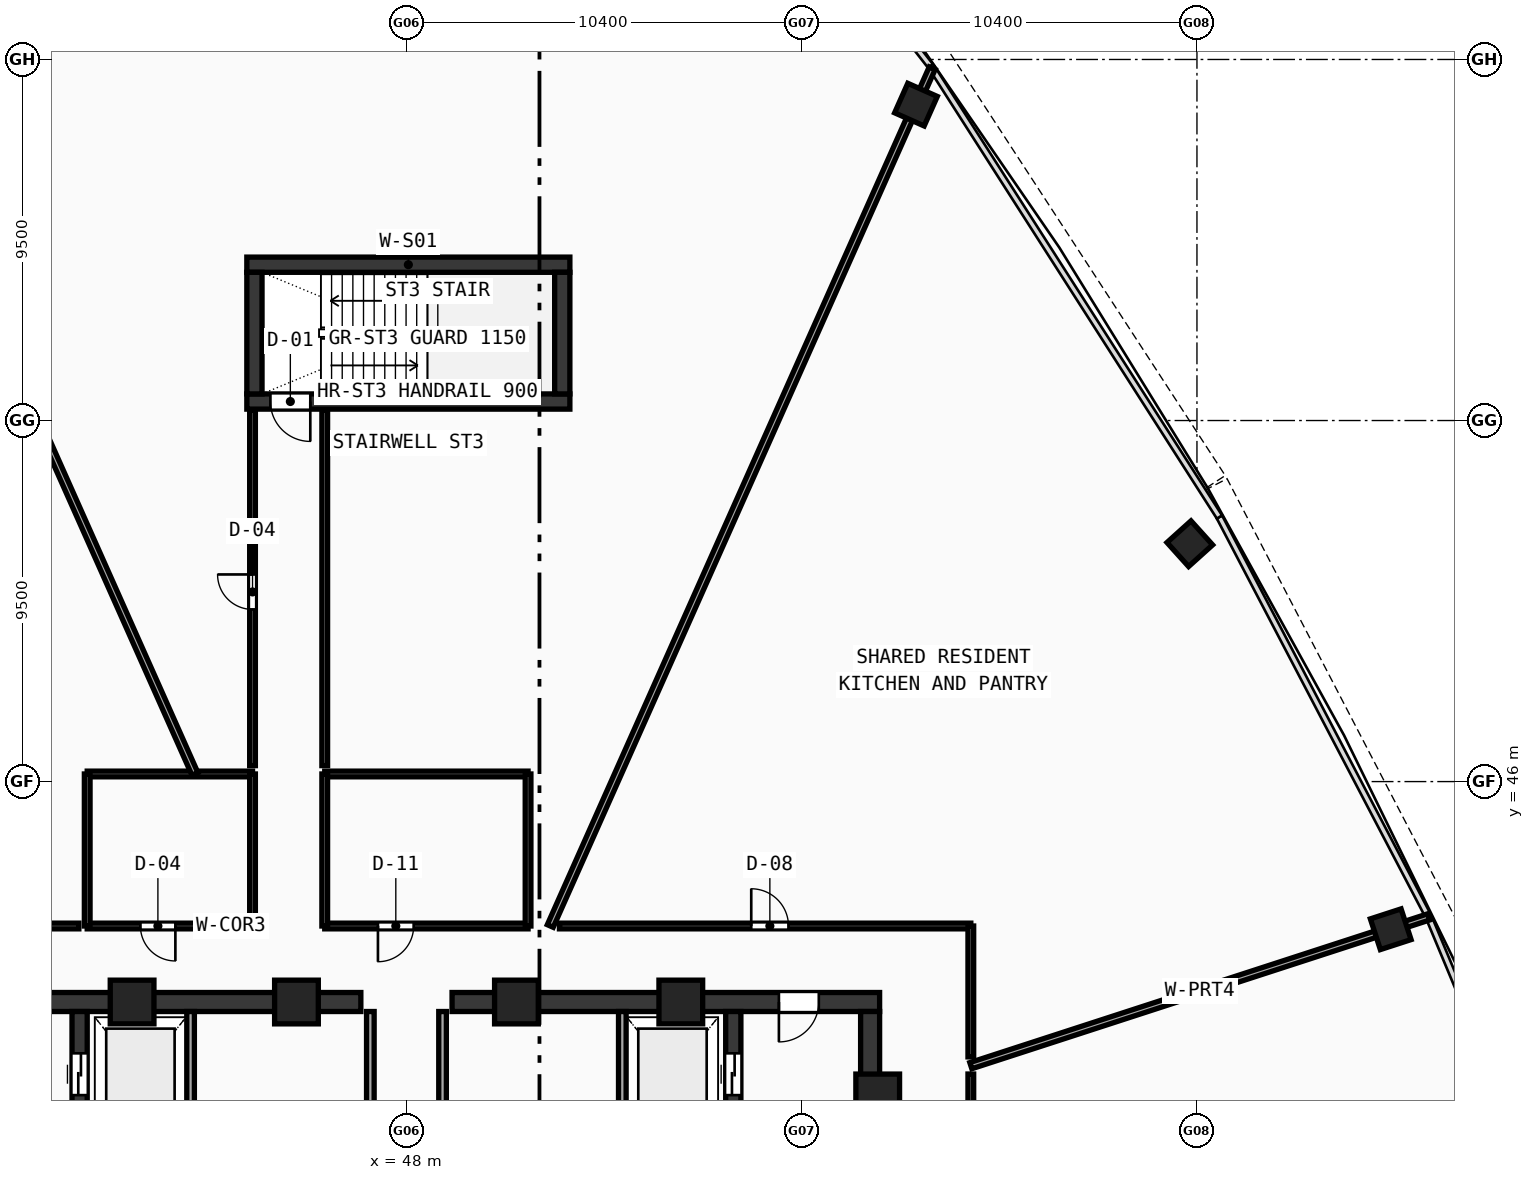
"""IFC4 building model, lengths in metres.
Left out: names, types, materials, properties, quantities, classifications, styles, units other than length and angle.
Written with IfcOpenShell. Run it as: python <this file> out.ifc"""

import sys

from ifc_helpers import new_model, si_unit, direction, frame, frame_2d, origin, origin_with_axes, origin_2d, place, context, subcontext, project, spatial, rectangle, hollow_rectangle, extrude, source, transform, mapped, element, fill, save


model = new_model("IFC4")
c1 = context("Model", 3, precision=1e-05, world=origin(), true_north=direction((0.0, 1.0)))
c2 = subcontext(c1, "Body", "Model", "MODEL_VIEW")
j1 = project(units=[si_unit("LENGTHUNIT", "METRE"), si_unit("PLANEANGLEUNIT", "RADIAN")], contexts=[c1])
p1 = place(None, origin())
s1 = spatial("IfcSite", under=j1, at=p1, CompositionType="ELEMENT")
p2 = place(p1, origin())
s2 = spatial("IfcBuilding", under=s1, at=p2, CompositionType="ELEMENT")
p3 = place(p2, frame((0.0, 0.0, 263.18)))
s3 = spatial("IfcBuildingStorey", under=s2, at=p3, CompositionType="ELEMENT", Elevation=263.18)
p4 = place(p3, frame((35.55, 40.2, 0.0), z_axis=(0.0, 0.0, 1.0), x_axis=(1.0, 0.0, 0.0)))
e1 = element("IfcWall", 1, at=p4, inside=s3, PredefinedType="SHEAR", context=c2, shape_type="SweptSolid", body=[
    extrude(rectangle(XDim=11.25, YDim=0.5, at=frame_2d((5.625, 0.0))), origin(), (0.0, 0.0, 1.0), 3.47),
])
p5 = place(p4, frame((1.6, 0.0, 0.0)))
e2 = element("IfcOpeningElement", 2, at=p5, cuts=e1, PredefinedType="OPENING", context=c2, shape_type="SweptSolid", body=[
    extrude(rectangle(XDim=1.05, YDim=2.1, at=frame_2d((0.525, 1.05))), frame((0.0, 0.26, 0.0), z_axis=(0.0, -1.0, 0.0), x_axis=(1.0, 0.0, 0.0)), (0.0, 0.0, 1.0), 0.52),
])
p6 = place(p3, frame((49.2, 40.2, 0.0), z_axis=(0.0, 0.0, 1.0), x_axis=(1.0, 0.0, 0.0)))
e3 = element("IfcWall", 3, at=p6, inside=s3, PredefinedType="SHEAR", context=c2, shape_type="SweptSolid", body=[
    extrude(rectangle(XDim=11.25, YDim=0.5, at=frame_2d((5.625, 0.0))), origin(), (0.0, 0.0, 1.0), 3.47),
])
p7 = place(p6, frame((8.6, 0.0, 0.0)))
e4 = element("IfcOpeningElement", 4, at=p7, cuts=e3, PredefinedType="OPENING", context=c2, shape_type="SweptSolid", body=[
    extrude(rectangle(XDim=1.05, YDim=2.1, at=frame_2d((0.525, 1.05))), frame((0.0, 0.26, 0.0), z_axis=(0.0, -1.0, 0.0), x_axis=(1.0, 0.0, 0.0)), (0.0, 0.0, 1.0), 0.52),
])
p8 = place(p3, frame((60.2, 27.75, 0.0), z_axis=(0.0, 0.0, 1.0), x_axis=(0.0, 1.0, 0.0)))
e5 = element("IfcWall", 5, at=p8, inside=s3, PredefinedType="SHEAR", context=c2, shape_type="SweptSolid", body=[
    extrude(rectangle(XDim=12.2, YDim=0.5, at=frame_2d((6.1, 0.0))), origin(), (0.0, 0.0, 1.0), 3.47),
])
p9 = place(p3, frame((39.4, 27.75, 0.0), z_axis=(0.0, 0.0, 1.0), x_axis=(0.0, 1.0, 0.0)))
e6 = element("IfcWall", 6, at=p9, inside=s3, PredefinedType="SHEAR", context=c2, shape_type="SweptSolid", body=[
    extrude(rectangle(XDim=12.2, YDim=0.4, at=frame_2d((6.1, 0.0))), origin(), (0.0, 0.0, 1.0), 3.47),
])
p10 = place(p9, frame((10.0, 0.0, 0.0)))
e7 = element("IfcOpeningElement", 7, at=p10, cuts=e6, PredefinedType="OPENING", context=c2, shape_type="SweptSolid", body=[
    extrude(rectangle(XDim=1.1, YDim=2.1, at=frame_2d((0.55, 1.05))), frame((0.0, 0.21, 0.0), z_axis=(0.0, -1.0, 0.0), x_axis=(1.0, 0.0, 0.0)), (0.0, 0.0, 1.0), 0.42),
])
p11 = place(p3, frame((56.6, 27.75, 0.0), z_axis=(0.0, 0.0, 1.0), x_axis=(0.0, 1.0, 0.0)))
e8 = element("IfcWall", 8, at=p11, inside=s3, PredefinedType="SHEAR", context=c2, shape_type="SweptSolid", body=[
    extrude(rectangle(XDim=12.2, YDim=0.4, at=frame_2d((6.1, 0.0))), origin(), (0.0, 0.0, 1.0), 3.47),
])
p12 = place(p11, frame((10.0, 0.0, 0.0)))
e9 = element("IfcOpeningElement", 9, at=p12, cuts=e8, PredefinedType="OPENING", context=c2, shape_type="SweptSolid", body=[
    extrude(rectangle(XDim=1.1, YDim=2.1, at=frame_2d((0.55, 1.05))), frame((0.0, 0.21, 0.0), z_axis=(0.0, -1.0, 0.0), x_axis=(1.0, 0.0, 0.0)), (0.0, 0.0, 1.0), 0.42),
])
p13 = place(p3, frame((43.8, 59.6, 0.0), z_axis=(0.0, 0.0, 1.0), x_axis=(1.0, 0.0, 0.0)))
e10 = element("IfcWall", 10, at=p13, inside=s3, PredefinedType="SHEAR", context=c2, shape_type="SweptSolid", body=[
    extrude(rectangle(XDim=8.5, YDim=0.4, at=frame_2d((4.25, 0.0))), origin(), (0.0, 0.0, 1.0), 3.47),
])
p14 = place(p3, frame((43.8, 56.0, 0.0), z_axis=(0.0, 0.0, 1.0), x_axis=(1.0, 0.0, 0.0)))
e11 = element("IfcWall", 11, at=p14, inside=s3, PredefinedType="SHEAR", context=c2, shape_type="SweptSolid", body=[
    extrude(rectangle(XDim=8.5, YDim=0.4, at=frame_2d((4.25, 0.0))), origin(), (0.0, 0.0, 1.0), 3.47),
])
p15 = place(p14, frame((0.62, 0.0, 0.0)))
e12 = element("IfcOpeningElement", 12, at=p15, cuts=e11, PredefinedType="OPENING", context=c2, shape_type="SweptSolid", body=[
    extrude(rectangle(XDim=1.05, YDim=2.1, at=frame_2d((0.525, 1.05))), frame((0.0, 0.21, 0.0), z_axis=(0.0, -1.0, 0.0), x_axis=(1.0, 0.0, 0.0)), (0.0, 0.0, 1.0), 0.42),
])
for number, where, z_axis, x_axis in (
    (13, (44.0, 56.2, 0.0), (0.0, 0.0, 1.0), (0.0, 1.0, 0.0)),
    (14, (52.1, 56.2, 0.0), (0.0, 0.0, 1.0), (0.0, 1.0, 0.0)),
):
    element("IfcWall", number, at=place(p3, frame(where, z_axis=z_axis, x_axis=x_axis)), inside=s3, PredefinedType="SHEAR", context=c2, shape_type="SweptSolid", body=[
        extrude(rectangle(XDim=3.2, YDim=0.4, at=frame_2d((1.6, 0.0))), origin(), (0.0, 0.0, 1.0), 3.47),
    ])
m1 = source(origin(), c2, "Body", "SweptSolid", [
    extrude(hollow_rectangle(XDim=1.15, YDim=1.15, WallThickness=0.048, at=origin_2d()), origin(), (0.0, 0.0, 1.0), 3.73),
])
for number, where, z_axis, x_axis in (
    (15, (60.4, 37.729, -0.26), (0.0, 0.0, 1.0), (1.0, 0.0, 0.0)),
    (16, (55.219, 40.2, -0.26), (0.0, 0.0, 1.0), (1.0, 0.0, 0.0)),
    (17, (50.894, 40.2, -0.26), (0.0, 0.0, 1.0), (1.0, 0.0, 0.0)),
    (18, (45.106, 40.2, -0.26), (0.0, 0.0, 1.0), (1.0, 0.0, 0.0)),
    (19, (40.781, 40.2, -0.26), (0.0, 0.0, 1.0), (1.0, 0.0, 0.0)),
):
    element("IfcColumn", number, at=place(p3, frame(where, z_axis=z_axis, x_axis=x_axis)), inside=s3, PredefinedType="COLUMN", context=c2, shape_type="MappedRepresentation", body=[
        mapped(m1, transform((0.0, 0.0, 0.0), scale=1.0)),
    ])
m2 = source(origin(), c2, "Body", "SweptSolid", [
    extrude(hollow_rectangle(XDim=0.85, YDim=0.85, WallThickness=0.034, at=origin_2d()), origin(), (0.0, 0.0, 1.0), 3.73),
])
for number, where, z_axis, x_axis in (
    (20, (73.899, 42.115, -0.26), (0.0, 0.0, 1.0), (-0.309, 0.951, 0.0)),
    (21, (68.612, 52.259, -0.26), (0.0, 0.0, 1.0), (-0.669, 0.743, 0.0)),
    (22, (61.407, 63.812, -0.26), (0.0, 0.0, 1.0), (-0.914, 0.407, 0.0)),
):
    element("IfcColumn", number, at=place(p3, frame(where, z_axis=z_axis, x_axis=x_axis)), inside=s3, PredefinedType="COLUMN", context=c2, shape_type="MappedRepresentation", body=[
        mapped(m2, transform((0.0, 0.0, 0.0), scale=1.0)),
    ])
p16 = place(p3, frame((42.32, 33.5, 0.0), z_axis=(0.0, 0.0, 1.0), x_axis=(0.0, 1.0, 0.0)))
e23 = element("IfcWall", 23, at=p16, inside=s3, PredefinedType="SOLIDWALL", context=c2, shape_type="SweptSolid", body=[
    extrude(rectangle(XDim=6.45, YDim=0.2, at=frame_2d((3.225, 0.0))), origin(), (0.0, 0.0, 1.0), 3.47),
])
p17 = place(p16, frame((1.0, 0.0, 0.0)))
e24 = element("IfcOpeningElement", 24, at=p17, cuts=e23, PredefinedType="OPENING", context=c2, shape_type="SweptSolid", body=[
    extrude(rectangle(XDim=1.05, YDim=2.1, at=frame_2d((0.525, 1.05))), frame((0.0, 0.11, 0.0), z_axis=(0.0, -1.0, 0.0), x_axis=(1.0, 0.0, 0.0)), (0.0, 0.0, 1.0), 0.22),
])
p18 = place(p3, frame((53.68, 36.65, 0.0), z_axis=(0.0, 0.0, 1.0), x_axis=(0.0, 1.0, 0.0)))
e25 = element("IfcWall", 25, at=p18, inside=s3, PredefinedType="SOLIDWALL", context=c2, shape_type="SweptSolid", body=[
    extrude(rectangle(XDim=3.3, YDim=0.2, at=frame_2d((1.65, 0.0))), origin(), (0.0, 0.0, 1.0), 3.47),
])
p19 = place(p3, frame((47.05, 37.32, 0.0), z_axis=(0.0, 0.0, 1.0), x_axis=(0.0, 1.0, 0.0)))
e26 = element("IfcWall", 26, at=p19, inside=s3, PredefinedType="SOLIDWALL", context=c2, shape_type="SweptSolid", body=[
    extrude(rectangle(XDim=2.63, YDim=0.2, at=frame_2d((1.315, 0.0))), origin(), (0.0, 0.0, 1.0), 3.47),
])
p20 = place(p3, frame((48.95, 35.85, 0.0), z_axis=(0.0, 0.0, 1.0), x_axis=(0.0, 1.0, 0.0)))
e27 = element("IfcWall", 27, at=p20, inside=s3, PredefinedType="SOLIDWALL", context=c2, shape_type="SweptSolid", body=[
    extrude(rectangle(XDim=4.1, YDim=0.2, at=frame_2d((2.05, 0.0))), origin(), (0.0, 0.0, 1.0), 3.47),
])
p21 = place(p3, frame((39.6, 42.2, 0.0), z_axis=(0.0, 0.0, 1.0), x_axis=(1.0, 0.0, 0.0)))
e28 = element("IfcWall", 28, at=p21, inside=s3, PredefinedType="PARTITIONING", context=c2, shape_type="SweptSolid", body=[
    extrude(rectangle(XDim=4.35, YDim=0.15, at=frame_2d((2.175, 0.0))), origin(), (0.0, 0.0, 1.0), 3.47),
])
p22 = place(p21, frame((1.4, 0.0, 0.0)))
e29 = element("IfcOpeningElement", 29, at=p22, cuts=e28, PredefinedType="OPENING", context=c2, shape_type="SweptSolid", body=[
    extrude(rectangle(XDim=0.92, YDim=2.1, at=frame_2d((0.46, 1.05))), frame((0.0, 0.085, 0.0), z_axis=(0.0, -1.0, 0.0), x_axis=(1.0, 0.0, 0.0)), (0.0, 0.0, 1.0), 0.17),
])
p23 = place(p3, frame((39.6, 46.2, 0.0), z_axis=(0.0, 0.0, 1.0), x_axis=(1.0, 0.0, 0.0)))
e30 = element("IfcWall", 30, at=p23, inside=s3, PredefinedType="PARTITIONING", context=c2, shape_type="SweptSolid", body=[
    extrude(rectangle(XDim=4.35, YDim=0.15, at=frame_2d((2.175, 0.0))), origin(), (0.0, 0.0, 1.0), 2.82),
])
p24 = place(p3, frame((39.6, 42.2, 0.0), z_axis=(0.0, 0.0, 1.0), x_axis=(0.0, 1.0, 0.0)))
e31 = element("IfcWall", 31, at=p24, inside=s3, PredefinedType="PARTITIONING", context=c2, shape_type="SweptSolid", body=[
    extrude(rectangle(XDim=4.0, YDim=0.15, at=frame_2d((2.0, 0.0))), origin(), (0.0, 0.0, 1.0), 3.47),
])
p25 = place(p3, frame((43.95, 42.2, 0.0), z_axis=(0.0, 0.0, 1.0), x_axis=(0.0, 1.0, 0.0)))
e32 = element("IfcWall", 32, at=p25, inside=s3, PredefinedType="PARTITIONING", context=c2, shape_type="SweptSolid", body=[
    extrude(rectangle(XDim=4.0, YDim=0.15, at=frame_2d((2.0, 0.0))), origin(), (0.0, 0.0, 1.0), 2.82),
])
p26 = place(p3, frame((45.85, 42.2, 0.0), z_axis=(0.0, 0.0, 1.0), x_axis=(1.0, 0.0, 0.0)))
e33 = element("IfcWall", 33, at=p26, inside=s3, PredefinedType="PARTITIONING", context=c2, shape_type="SweptSolid", body=[
    extrude(rectangle(XDim=5.35, YDim=0.15, at=frame_2d((2.675, 0.0))), origin(), (0.0, 0.0, 1.0), 3.47),
])
p27 = place(p26, frame((1.4, 0.0, 0.0)))
e34 = element("IfcOpeningElement", 34, at=p27, cuts=e33, PredefinedType="OPENING", context=c2, shape_type="SweptSolid", body=[
    extrude(rectangle(XDim=0.94, YDim=2.1, at=frame_2d((0.47, 1.05))), frame((0.0, 0.085, 0.0), z_axis=(0.0, -1.0, 0.0), x_axis=(1.0, 0.0, 0.0)), (0.0, 0.0, 1.0), 0.17),
])
p28 = place(p3, frame((45.85, 46.2, 0.0), z_axis=(0.0, 0.0, 1.0), x_axis=(1.0, 0.0, 0.0)))
e35 = element("IfcWall", 35, at=p28, inside=s3, PredefinedType="PARTITIONING", context=c2, shape_type="SweptSolid", body=[
    extrude(rectangle(XDim=5.35, YDim=0.15, at=frame_2d((2.675, 0.0))), origin(), (0.0, 0.0, 1.0), 3.47),
])
for number, where, z_axis, x_axis in (
    (36, (45.85, 42.2, 0.0), (0.0, 0.0, 1.0), (0.0, 1.0, 0.0)),
    (37, (51.2, 42.2, 0.0), (0.0, 0.0, 1.0), (0.0, 1.0, 0.0)),
):
    element("IfcWall", number, at=place(p3, frame(where, z_axis=z_axis, x_axis=x_axis)), inside=s3, PredefinedType="PARTITIONING", context=c2, shape_type="SweptSolid", body=[
        extrude(rectangle(XDim=4.0, YDim=0.15, at=frame_2d((2.0, 0.0))), origin(), (0.0, 0.0, 1.0), 3.47),
    ])
p29 = place(p3, frame((62.85, 38.525, 0.0), z_axis=(0.0, 0.0, 1.0), x_axis=(0.951057436246, 0.309014163043, 0.0)))
e38 = element("IfcWall", 38, at=p29, inside=s3, PredefinedType="PARTITIONING", context=c2, shape_type="SweptSolid", body=[
    extrude(rectangle(XDim=12.667, YDim=0.17, at=frame_2d((6.333, 0.0))), origin(), (0.0, 0.0, 1.0), 2.82),
])
p30 = place(p3, frame((51.784, 42.2, 0.0), z_axis=(0.0, 0.0, 1.0), x_axis=(0.406737985753, 0.913544859843, 0.0)))
e39 = element("IfcWall", 39, at=p30, inside=s3, PredefinedType="PARTITIONING", context=c2, shape_type="SweptSolid", body=[
    extrude(rectangle(XDim=24.707, YDim=0.17, at=frame_2d((12.354, 0.0))), origin(), (0.0, 0.0, 1.0), 2.82),
])
p31 = place(p3, frame((42.435, 46.2, 0.0), z_axis=(0.0, 0.0, 1.0), x_axis=(-0.406734534197, 0.913546396573, 0.0)))
e40 = element("IfcWall", 40, at=p31, inside=s3, PredefinedType="PARTITIONING", context=c2, shape_type="SweptSolid", body=[
    extrude(rectangle(XDim=20.329, YDim=0.17, at=frame_2d((10.164, 0.0))), origin(), (0.0, 0.0, 1.0), 2.82),
])
p32 = place(p3, frame((36.081, 42.2, 0.0), z_axis=(0.0, 0.0, 1.0), x_axis=(1.0, 0.0, 0.0)))
e41 = element("IfcWall", 41, at=p32, inside=s3, PredefinedType="PARTITIONING", context=c2, shape_type="SweptSolid", body=[
    extrude(rectangle(XDim=3.299, YDim=0.15, at=frame_2d((1.65, 0.0))), origin(), (0.0, 0.0, 1.0), 2.82),
])
p33 = place(p32, frame((1.175, 0.0, 0.0)))
e42 = element("IfcOpeningElement", 42, at=p33, cuts=e41, PredefinedType="OPENING", context=c2, shape_type="SweptSolid", body=[
    extrude(rectangle(XDim=0.98, YDim=2.12, at=frame_2d((0.49, 1.06))), frame((0.0, 0.085, 0.0), z_axis=(0.0, -1.0, 0.0), x_axis=(1.0, 0.0, 0.0)), (0.0, 0.0, 1.0), 0.17),
])
p34 = place(p3, frame((43.95, 46.42, 0.0), z_axis=(0.0, 0.0, 1.0), x_axis=(0.0, 1.0, 0.0)))
e43 = element("IfcWall", 43, at=p34, inside=s3, PredefinedType="PARTITIONING", context=c2, shape_type="SweptSolid", body=[
    extrude(rectangle(XDim=9.36, YDim=0.15, at=frame_2d((4.68, 0.0))), origin(), (0.0, 0.0, 1.0), 3.12),
])
p35 = place(p34, frame((4.11, 0.0, 0.0)))
e44 = element("IfcOpeningElement", 44, at=p35, cuts=e43, PredefinedType="OPENING", context=c2, shape_type="SweptSolid", body=[
    extrude(rectangle(XDim=0.92, YDim=2.1, at=frame_2d((0.46, 1.05))), frame((0.0, 0.085, 0.0), z_axis=(0.0, -1.0, 0.0), x_axis=(1.0, 0.0, 0.0)), (0.0, 0.0, 1.0), 0.17),
])
p36 = place(p3, frame((45.85, 55.78, 0.0), z_axis=(0.0, 0.0, 1.0), x_axis=(0.0, -1.0, 0.0)))
e45 = element("IfcWall", 45, at=p36, inside=s3, PredefinedType="PARTITIONING", context=c2, shape_type="SweptSolid", body=[
    extrude(rectangle(XDim=9.36, YDim=0.15, at=frame_2d((4.68, 0.0))), origin(), (0.0, 0.0, 1.0), 3.12),
])
p37 = place(p3, frame((52.025, 42.2, 0.0), z_axis=(0.0, 0.0, 1.0), x_axis=(1.0, 0.0, 0.0)))
e46 = element("IfcWall", 46, at=p37, inside=s3, PredefinedType="PARTITIONING", context=c2, shape_type="SweptSolid", body=[
    extrude(rectangle(XDim=10.825, YDim=0.15, at=frame_2d((5.413, 0.0))), origin(), (0.0, 0.0, 1.0), 2.82),
])
p38 = place(p37, frame((5.047, 0.0, 0.0)))
e47 = element("IfcOpeningElement", 47, at=p38, cuts=e46, PredefinedType="OPENING", context=c2, shape_type="SweptSolid", body=[
    extrude(rectangle(XDim=0.98, YDim=2.12, at=frame_2d((0.49, 1.06))), frame((0.0, 0.085, 0.0), z_axis=(0.0, -1.0, 0.0), x_axis=(1.0, 0.0, 0.0)), (0.0, 0.0, 1.0), 0.17),
])
p39 = place(p3, frame((62.85, 42.2, 0.0), z_axis=(0.0, 0.0, 1.0), x_axis=(0.0, -1.0, 0.0)))
e48 = element("IfcWall", 48, at=p39, inside=s3, PredefinedType="PARTITIONING", context=c2, shape_type="SweptSolid", body=[
    extrude(rectangle(XDim=3.444, YDim=0.15, at=frame_2d((1.722, 0.0))), origin(), (0.0, 0.0, 1.0), 3.12),
])
p40 = place(p3, frame((62.85, 38.305, 0.0), z_axis=(0.0, 0.0, 1.0), x_axis=(0.0, -1.0, 0.0)))
e49 = element("IfcWall", 49, at=p40, inside=s3, PredefinedType="PARTITIONING", context=c2, shape_type="SweptSolid", body=[
    extrude(rectangle(XDim=7.004, YDim=0.15, at=frame_2d((3.502, 0.0))), origin(), (0.0, 0.0, 1.0), 3.47),
])
p41 = place(p40, frame((3.042, 0.0, 0.0)))
e50 = element("IfcOpeningElement", 50, at=p41, cuts=e49, PredefinedType="OPENING", context=c2, shape_type="SweptSolid", body=[
    extrude(rectangle(XDim=0.92, YDim=2.1, at=frame_2d((0.46, 1.05))), frame((0.0, 0.085, 0.0), z_axis=(0.0, -1.0, 0.0), x_axis=(1.0, 0.0, 0.0)), (0.0, 0.0, 1.0), 0.17),
])
m3 = source(origin(), c2, "Body", "SweptSolid", [
    extrude(rectangle(XDim=1.05, YDim=2.1, at=frame_2d((0.525, 1.05))), frame((0.0, 0.025, 0.0), z_axis=(0.0, -1.0, 0.0), x_axis=(1.0, 0.0, 0.0)), (0.0, 0.0, 1.0), 0.05),
])
p42 = place(p7, frame((1.05, 0.0, 0.0), z_axis=(0.0, 0.0, 1.0), x_axis=(-1.0, 0.0, 0.0)))
e51 = element("IfcDoor", 51, at=p42, inside=s3, OperationType="SINGLE_SWING_RIGHT", PredefinedType="DOOR", context=c2, shape_type="MappedRepresentation", body=[
    mapped(m3, transform((0.0, 0.0, 0.0), scale=1.0)),
])
fill(e4, e51)
m4 = source(origin(), c2, "Body", "SweptSolid", [
    extrude(rectangle(XDim=1.1, YDim=2.1, at=frame_2d((0.55, 1.05))), frame((0.0, 0.025, 0.0), z_axis=(0.0, -1.0, 0.0), x_axis=(1.0, 0.0, 0.0)), (0.0, 0.0, 1.0), 0.05),
])
p43 = place(p10, frame((1.1, 0.0, 0.0), z_axis=(0.0, 0.0, 1.0), x_axis=(-1.0, 0.0, 0.0)))
e52 = element("IfcDoor", 52, at=p43, inside=s3, OperationType="DOUBLE_DOOR_SLIDING", PredefinedType="DOOR", context=c2, shape_type="MappedRepresentation", body=[
    mapped(m4, transform((0.0, 0.0, 0.0), scale=1.0)),
])
fill(e7, e52)
p44 = place(p12, origin_with_axes())
e53 = element("IfcDoor", 53, at=p44, inside=s3, OperationType="DOUBLE_DOOR_SLIDING", PredefinedType="DOOR", context=c2, shape_type="MappedRepresentation", body=[
    mapped(m4, transform((0.0, 0.0, 0.0), scale=1.0)),
])
fill(e9, e53)
p45 = place(p15, frame((1.05, 0.0, 0.0), z_axis=(0.0, 0.0, 1.0), x_axis=(-1.0, 0.0, 0.0)))
e54 = element("IfcDoor", 54, at=p45, inside=s3, OperationType="SINGLE_SWING_LEFT", PredefinedType="DOOR", context=c2, shape_type="MappedRepresentation", body=[
    mapped(m3, transform((0.0, 0.0, 0.0), scale=1.0)),
])
fill(e12, e54)
m5 = source(origin(), c2, "Body", "SweptSolid", [
    extrude(rectangle(XDim=0.92, YDim=2.1, at=frame_2d((0.46, 1.05))), frame((0.0, 0.025, 0.0), z_axis=(0.0, -1.0, 0.0), x_axis=(1.0, 0.0, 0.0)), (0.0, 0.0, 1.0), 0.05),
])
p46 = place(p22, frame((0.92, 0.0, 0.0), z_axis=(0.0, 0.0, 1.0), x_axis=(-1.0, 0.0, 0.0)))
e55 = element("IfcDoor", 55, at=p46, inside=s3, OperationType="SINGLE_SWING_LEFT", PredefinedType="DOOR", context=c2, shape_type="MappedRepresentation", body=[
    mapped(m5, transform((0.0, 0.0, 0.0), scale=1.0)),
])
fill(e29, e55)
m6 = source(origin(), c2, "Body", "SweptSolid", [
    extrude(rectangle(XDim=0.94, YDim=2.1, at=frame_2d((0.47, 1.05))), frame((0.0, 0.025, 0.0), z_axis=(0.0, -1.0, 0.0), x_axis=(1.0, 0.0, 0.0)), (0.0, 0.0, 1.0), 0.05),
])
p47 = place(p27, frame((0.94, 0.0, 0.0), z_axis=(0.0, 0.0, 1.0), x_axis=(-1.0, 0.0, 0.0)))
e56 = element("IfcDoor", 56, at=p47, inside=s3, OperationType="SINGLE_SWING_RIGHT", PredefinedType="DOOR", context=c2, shape_type="MappedRepresentation", body=[
    mapped(m6, transform((0.0, 0.0, 0.0), scale=1.0)),
])
fill(e34, e56)
m7 = source(origin(), c2, "Body", "SweptSolid", [
    extrude(rectangle(XDim=0.98, YDim=2.12, at=frame_2d((0.49, 1.06))), frame((0.0, 0.025, 0.0), z_axis=(0.0, -1.0, 0.0), x_axis=(1.0, 0.0, 0.0)), (0.0, 0.0, 1.0), 0.05),
])
p48 = place(p38, origin_with_axes())
e57 = element("IfcDoor", 57, at=p48, inside=s3, OperationType="SINGLE_SWING_LEFT", PredefinedType="DOOR", context=c2, shape_type="MappedRepresentation", body=[
    mapped(m7, transform((0.0, 0.0, 0.0), scale=1.0)),
])
fill(e47, e57)
p49 = place(p35, origin_with_axes())
e58 = element("IfcDoor", 58, at=p49, inside=s3, OperationType="SINGLE_SWING_RIGHT", PredefinedType="DOOR", context=c2, shape_type="MappedRepresentation", body=[
    mapped(m5, transform((0.0, 0.0, 0.0), scale=1.0)),
])
fill(e44, e58)
save(model, sys.argv[1])
